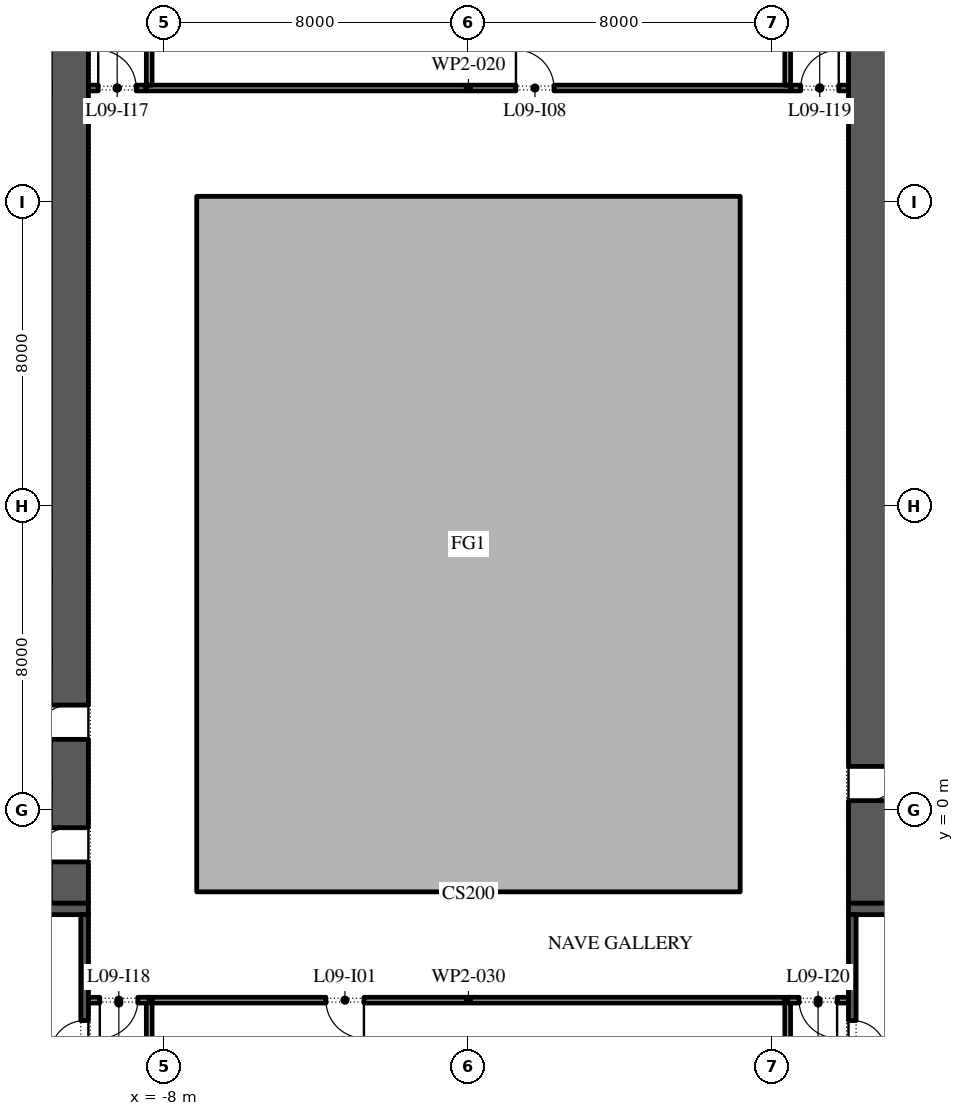
"""IFC4 building model, lengths in metres.
Left out: names, types, materials, properties, quantities, classifications, styles, units other than length and angle.
Written with IfcOpenShell. Run it as: python <this file> out.ifc"""

import sys

from ifc_helpers import new_model, si_unit, direction, frame, frame_2d, origin, place, context, subcontext, project, spatial, polyline, rectangle, outline, extrude, element, fill, save


model = new_model("IFC4")
c1 = context("Model", 3, precision=1e-05, world=origin(), true_north=direction((0.0, 1.0)))
c2 = subcontext(c1, "Body", "Model", "MODEL_VIEW")
j1 = project(units=[si_unit("LENGTHUNIT", "METRE"), si_unit("PLANEANGLEUNIT", "RADIAN")], contexts=[c1])
p1 = place(None, origin())
s1 = spatial("IfcSite", under=j1, at=p1, CompositionType="ELEMENT")
p2 = place(p1, origin())
s2 = spatial("IfcBuilding", under=s1, at=p2, CompositionType="ELEMENT")
p3 = place(p2, frame((0.0, 0.0, 48.0)))
s3 = spatial("IfcBuildingStorey", under=s2, at=p3, CompositionType="ELEMENT", Elevation=48.0)
p4 = place(p3, origin())
e1 = element("IfcWall", 1, at=p4, inside=s3, PredefinedType="STANDARD", context=c2, shape_type="SweptSolid", body=[
    extrude(outline(polyline([(-7.15, -2.15), (7.15, -2.15), (7.15, 16.15), (-7.15, 16.15), (-7.15, -2.15)]), holes=[polyline([(-7.0, -2.0), (-7.0, 16.0), (7.0, 16.0), (7.0, -2.0), (-7.0, -2.0)])]), origin(), (0.0, 0.0, 1.0), 4.0),
])
p5 = place(p3, frame((-10.5, -2.45, 0.0), z_axis=(0.0, 0.0, 1.0), x_axis=(0.0, 1.0, 0.0)))
e2 = element("IfcWall", 2, at=p5, inside=s3, PredefinedType="SHEAR", context=c2, shape_type="SweptSolid", body=[
    extrude(rectangle(XDim=27.9, YDim=1.0, at=frame_2d((13.95, 0.0))), origin(), (0.0, 0.0, 1.0), 4.0),
])
p6 = place(p5, frame((23.65, 0.0, 0.0)))
e3 = element("IfcOpeningElement", 3, at=p6, cuts=e2, PredefinedType="OPENING", context=c2, shape_type="SweptSolid", body=[
    extrude(rectangle(XDim=2.4, YDim=2.1, at=frame_2d((1.2, 1.05))), frame((0.0, 0.51, 0.0), z_axis=(0.0, -1.0, 0.0), x_axis=(1.0, 0.0, 0.0)), (0.0, 0.0, 1.0), 1.02),
])
p7 = place(p5, frame((1.087, 0.0, 0.0)))
e4 = element("IfcOpeningElement", 4, at=p7, cuts=e2, PredefinedType="OPENING", context=c2, shape_type="SweptSolid", body=[
    extrude(rectangle(XDim=0.9, YDim=2.1, at=frame_2d((0.45, 1.05))), frame((0.0, 0.51, 0.0), z_axis=(0.0, -1.0, 0.0), x_axis=(1.0, 0.0, 0.0)), (0.0, 0.0, 1.0), 1.02),
])
p8 = place(p5, frame((4.312, 0.0, 0.0)))
e5 = element("IfcOpeningElement", 5, at=p8, cuts=e2, PredefinedType="OPENING", context=c2, shape_type="SweptSolid", body=[
    extrude(rectangle(XDim=0.9, YDim=2.1, at=frame_2d((0.45, 1.05))), frame((0.0, 0.51, 0.0), z_axis=(0.0, -1.0, 0.0), x_axis=(1.0, 0.0, 0.0)), (0.0, 0.0, 1.0), 1.02),
])
p9 = place(p3, frame((-22.0, -2.6, 0.0), z_axis=(0.0, 0.0, 1.0), x_axis=(1.0, 0.0, 0.0)))
e6 = element("IfcWall", 6, at=p9, inside=s3, PredefinedType="SHEAR", context=c2, shape_type="SweptSolid", body=[
    extrude(rectangle(XDim=12.0, YDim=0.3, at=frame_2d((6.0, 0.0))), origin(), (0.0, 0.0, 1.0), 4.0),
])
p10 = place(p3, frame((-10.1, -15.8, 0.0), z_axis=(0.0, 0.0, 1.0), x_axis=(0.0, 1.0, 0.0)))
e7 = element("IfcWall", 7, at=p10, inside=s3, PredefinedType="SHEAR", context=c2, shape_type="SweptSolid", body=[
    extrude(rectangle(XDim=13.05, YDim=0.2, at=frame_2d((6.525, 0.0))), origin(), (0.0, 0.0, 1.0), 4.0),
])
p11 = place(p10, frame((2.762, 0.0, 0.0)))
e8 = element("IfcOpeningElement", 8, at=p11, cuts=e7, PredefinedType="OPENING", context=c2, shape_type="SweptSolid", body=[
    extrude(rectangle(XDim=0.9, YDim=2.1, at=frame_2d((0.45, 1.05))), frame((0.0, 0.11, 0.0), z_axis=(0.0, -1.0, 0.0), x_axis=(1.0, 0.0, 0.0)), (0.0, 0.0, 1.0), 0.22),
])
p12 = place(p10, frame((9.363, 0.0, 0.0)))
e9 = element("IfcOpeningElement", 9, at=p12, cuts=e7, PredefinedType="OPENING", context=c2, shape_type="SweptSolid", body=[
    extrude(rectangle(XDim=0.9, YDim=2.1, at=frame_2d((0.45, 1.05))), frame((0.0, 0.11, 0.0), z_axis=(0.0, -1.0, 0.0), x_axis=(1.0, 0.0, 0.0)), (0.0, 0.0, 1.0), 0.22),
])
p13 = place(p3, frame((10.5, -2.45, 0.0), z_axis=(0.0, 0.0, 1.0), x_axis=(0.0, 1.0, 0.0)))
e10 = element("IfcWall", 10, at=p13, inside=s3, PredefinedType="SHEAR", context=c2, shape_type="SweptSolid", body=[
    extrude(rectangle(XDim=27.9, YDim=1.0, at=frame_2d((13.95, 0.0))), origin(), (0.0, 0.0, 1.0), 4.0),
])
p14 = place(p13, frame((23.65, 0.0, 0.0)))
e11 = element("IfcOpeningElement", 11, at=p14, cuts=e10, PredefinedType="OPENING", context=c2, shape_type="SweptSolid", body=[
    extrude(rectangle(XDim=2.4, YDim=2.1, at=frame_2d((1.2, 1.05))), frame((0.0, 0.51, 0.0), z_axis=(0.0, -1.0, 0.0), x_axis=(1.0, 0.0, 0.0)), (0.0, 0.0, 1.0), 1.02),
])
p15 = place(p13, frame((2.7, 0.0, 0.0)))
e12 = element("IfcOpeningElement", 12, at=p15, cuts=e10, PredefinedType="OPENING", context=c2, shape_type="SweptSolid", body=[
    extrude(rectangle(XDim=0.9, YDim=2.1, at=frame_2d((0.45, 1.05))), frame((0.0, 0.51, 0.0), z_axis=(0.0, -1.0, 0.0), x_axis=(1.0, 0.0, 0.0)), (0.0, 0.0, 1.0), 1.02),
])
p16 = place(p3, frame((10.0, -2.6, 0.0), z_axis=(0.0, 0.0, 1.0), x_axis=(1.0, 0.0, 0.0)))
e13 = element("IfcWall", 13, at=p16, inside=s3, PredefinedType="SHEAR", context=c2, shape_type="SweptSolid", body=[
    extrude(rectangle(XDim=12.0, YDim=0.3, at=frame_2d((6.0, 0.0))), origin(), (0.0, 0.0, 1.0), 4.0),
])
p17 = place(p3, frame((10.1, -15.8, 0.0), z_axis=(0.0, 0.0, 1.0), x_axis=(0.0, 1.0, 0.0)))
e14 = element("IfcWall", 14, at=p17, inside=s3, PredefinedType="SHEAR", context=c2, shape_type="SweptSolid", body=[
    extrude(rectangle(XDim=13.05, YDim=0.2, at=frame_2d((6.525, 0.0))), origin(), (0.0, 0.0, 1.0), 4.0),
])
p18 = place(p17, frame((1.175, 0.0, 0.0)))
e15 = element("IfcOpeningElement", 15, at=p18, cuts=e14, PredefinedType="OPENING", context=c2, shape_type="SweptSolid", body=[
    extrude(rectangle(XDim=0.9, YDim=2.1, at=frame_2d((0.45, 1.05))), frame((0.0, 0.11, 0.0), z_axis=(0.0, -1.0, 0.0), x_axis=(1.0, 0.0, 0.0)), (0.0, 0.0, 1.0), 0.22),
])
p19 = place(p17, frame((4.413, 0.0, 0.0)))
e16 = element("IfcOpeningElement", 16, at=p19, cuts=e14, PredefinedType="OPENING", context=c2, shape_type="SweptSolid", body=[
    extrude(rectangle(XDim=1.0, YDim=2.1, at=frame_2d((0.5, 1.05))), frame((0.0, 0.11, 0.0), z_axis=(0.0, -1.0, 0.0), x_axis=(1.0, 0.0, 0.0)), (0.0, 0.0, 1.0), 0.22),
])
p20 = place(p17, frame((9.363, 0.0, 0.0)))
e17 = element("IfcOpeningElement", 17, at=p20, cuts=e14, PredefinedType="OPENING", context=c2, shape_type="SweptSolid", body=[
    extrude(rectangle(XDim=0.9, YDim=2.1, at=frame_2d((0.45, 1.05))), frame((0.0, 0.11, 0.0), z_axis=(0.0, -1.0, 0.0), x_axis=(1.0, 0.0, 0.0)), (0.0, 0.0, 1.0), 0.22),
])
p21 = place(p3, frame((-8.4, -4.925, 0.0), z_axis=(0.0, 0.0, 1.0), x_axis=(0.0, -1.0, 0.0)))
e18 = element("IfcWall", 18, at=p21, inside=s3, PredefinedType="PARTITIONING", context=c2, shape_type="SweptSolid", body=[
    extrude(rectangle(XDim=5.195, YDim=0.15, at=frame_2d((2.598, 0.0))), origin(), (0.0, 0.0, 1.0), 4.0),
])
p22 = place(p3, frame((-8.475, 19.0, 0.0), z_axis=(0.0, 0.0, 1.0), x_axis=(1.0, 0.0, 0.0)))
e19 = element("IfcWall", 19, at=p22, inside=s3, PredefinedType="PARTITIONING", context=c2, shape_type="SweptSolid", body=[
    extrude(rectangle(XDim=16.95, YDim=0.15, at=frame_2d((8.475, 0.0))), origin(), (0.0, 0.0, 1.0), 4.0),
])
p23 = place(p22, frame((9.725, 0.0, 0.0)))
e20 = element("IfcOpeningElement", 20, at=p23, cuts=e19, PredefinedType="OPENING", context=c2, shape_type="SweptSolid", body=[
    extrude(rectangle(XDim=1.0, YDim=2.1, at=frame_2d((0.5, 1.05))), frame((0.0, 0.085, 0.0), z_axis=(0.0, -1.0, 0.0), x_axis=(1.0, 0.0, 0.0)), (0.0, 0.0, 1.0), 0.17),
])
p24 = place(p3, frame((-8.4, 27.05, 0.0), z_axis=(0.0, 0.0, 1.0), x_axis=(0.0, -1.0, 0.0)))
e21 = element("IfcWall", 21, at=p24, inside=s3, PredefinedType="PARTITIONING", context=c2, shape_type="SweptSolid", body=[
    extrude(rectangle(XDim=7.975, YDim=0.15, at=frame_2d((3.988, 0.0))), origin(), (0.0, 0.0, 1.0), 4.0),
])
p25 = place(p3, frame((8.4, -10.12, 0.0), z_axis=(0.0, 0.0, 1.0), x_axis=(0.0, 1.0, 0.0)))
e22 = element("IfcWall", 22, at=p25, inside=s3, PredefinedType="PARTITIONING", context=c2, shape_type="SweptSolid", body=[
    extrude(rectangle(XDim=5.195, YDim=0.15, at=frame_2d((2.598, 0.0))), origin(), (0.0, 0.0, 1.0), 4.0),
])
p26 = place(p3, frame((8.325, -5.0, 0.0), z_axis=(0.0, 0.0, 1.0), x_axis=(-1.0, 0.0, 0.0)))
e23 = element("IfcWall", 23, at=p26, inside=s3, PredefinedType="PARTITIONING", context=c2, shape_type="SweptSolid", body=[
    extrude(rectangle(XDim=16.65, YDim=0.15, at=frame_2d((8.325, 0.0))), origin(), (0.0, 0.0, 1.0), 4.0),
])
p27 = place(p26, frame((11.075, 0.0, 0.0)))
e24 = element("IfcOpeningElement", 24, at=p27, cuts=e23, PredefinedType="OPENING", context=c2, shape_type="SweptSolid", body=[
    extrude(rectangle(XDim=1.0, YDim=2.1, at=frame_2d((0.5, 1.05))), frame((0.0, 0.085, 0.0), z_axis=(0.0, -1.0, 0.0), x_axis=(1.0, 0.0, 0.0)), (0.0, 0.0, 1.0), 0.17),
])
p28 = place(p3, frame((8.4, 19.075, 0.0), z_axis=(0.0, 0.0, 1.0), x_axis=(0.0, 1.0, 0.0)))
e25 = element("IfcWall", 25, at=p28, inside=s3, PredefinedType="PARTITIONING", context=c2, shape_type="SweptSolid", body=[
    extrude(rectangle(XDim=7.975, YDim=0.15, at=frame_2d((3.988, 0.0))), origin(), (0.0, 0.0, 1.0), 4.0),
])
p29 = place(p3, frame((-10.0, 19.0, 0.0), z_axis=(0.0, 0.0, 1.0), x_axis=(1.0, 0.0, 0.0)))
e26 = element("IfcWall", 26, at=p29, inside=s3, PredefinedType="PARTITIONING", context=c2, shape_type="SweptSolid", body=[
    extrude(rectangle(XDim=1.515, YDim=0.15, at=frame_2d((0.757, 0.0))), origin(), (0.0, 0.0, 1.0), 4.0),
])
p30 = place(p29, frame((0.258, 0.0, 0.0)))
e27 = element("IfcOpeningElement", 27, at=p30, cuts=e26, PredefinedType="OPENING", context=c2, shape_type="SweptSolid", body=[
    extrude(rectangle(XDim=1.0, YDim=2.1, at=frame_2d((0.5, 1.05))), frame((0.0, 0.085, 0.0), z_axis=(0.0, -1.0, 0.0), x_axis=(1.0, 0.0, 0.0)), (0.0, 0.0, 1.0), 0.17),
])
p31 = place(p3, frame((-8.4, -5.0, 0.0), z_axis=(0.0, 0.0, 1.0), x_axis=(-1.0, 0.0, 0.0)))
e28 = element("IfcWall", 28, at=p31, inside=s3, PredefinedType="PARTITIONING", context=c2, shape_type="SweptSolid", body=[
    extrude(rectangle(XDim=1.6, YDim=0.15, at=frame_2d((0.8, 0.0))), origin(), (0.0, 0.0, 1.0), 4.0),
])
p32 = place(p31, frame((0.3, 0.0, 0.0)))
e29 = element("IfcOpeningElement", 29, at=p32, cuts=e28, PredefinedType="OPENING", context=c2, shape_type="SweptSolid", body=[
    extrude(rectangle(XDim=1.0, YDim=2.1, at=frame_2d((0.5, 1.05))), frame((0.0, 0.085, 0.0), z_axis=(0.0, -1.0, 0.0), x_axis=(1.0, 0.0, 0.0)), (0.0, 0.0, 1.0), 0.17),
])
p33 = place(p3, frame((8.485, 19.0, 0.0), z_axis=(0.0, 0.0, 1.0), x_axis=(1.0, 0.0, 0.0)))
e30 = element("IfcWall", 30, at=p33, inside=s3, PredefinedType="PARTITIONING", context=c2, shape_type="SweptSolid", body=[
    extrude(rectangle(XDim=1.515, YDim=0.15, at=frame_2d((0.757, 0.0))), origin(), (0.0, 0.0, 1.0), 4.0),
])
p34 = place(p33, frame((0.258, 0.0, 0.0)))
e31 = element("IfcOpeningElement", 31, at=p34, cuts=e30, PredefinedType="OPENING", context=c2, shape_type="SweptSolid", body=[
    extrude(rectangle(XDim=1.0, YDim=2.1, at=frame_2d((0.5, 1.05))), frame((0.0, 0.085, 0.0), z_axis=(0.0, -1.0, 0.0), x_axis=(1.0, 0.0, 0.0)), (0.0, 0.0, 1.0), 0.17),
])
p35 = place(p3, frame((10.0, -5.0, 0.0), z_axis=(0.0, 0.0, 1.0), x_axis=(-1.0, 0.0, 0.0)))
e32 = element("IfcWall", 32, at=p35, inside=s3, PredefinedType="PARTITIONING", context=c2, shape_type="SweptSolid", body=[
    extrude(rectangle(XDim=1.6, YDim=0.15, at=frame_2d((0.8, 0.0))), origin(), (0.0, 0.0, 1.0), 4.0),
])
p36 = place(p35, frame((0.3, 0.0, 0.0)))
e33 = element("IfcOpeningElement", 33, at=p36, cuts=e32, PredefinedType="OPENING", context=c2, shape_type="SweptSolid", body=[
    extrude(rectangle(XDim=1.0, YDim=2.1, at=frame_2d((0.5, 1.05))), frame((0.0, 0.085, 0.0), z_axis=(0.0, -1.0, 0.0), x_axis=(1.0, 0.0, 0.0)), (0.0, 0.0, 1.0), 0.17),
])
p37 = place(p12, origin())
e34 = element("IfcDoor", 34, at=p37, inside=s3, OperationType="SINGLE_SWING_RIGHT", PredefinedType="DOOR", context=c2, shape_type="SweptSolid", body=[
    extrude(rectangle(XDim=0.9, YDim=2.1, at=frame_2d((0.45, 1.05))), frame((0.0, 0.1, 0.0), z_axis=(0.0, -1.0, 0.0), x_axis=(1.0, 0.0, 0.0)), (0.0, 0.0, 1.0), 0.05),
])
fill(e9, e34)
p38 = place(p20, frame((0.9, -0.15, 0.0), z_axis=(0.0, 0.0, 1.0), x_axis=(-1.0, 0.0, 0.0)))
e35 = element("IfcDoor", 35, at=p38, inside=s3, OperationType="SINGLE_SWING_LEFT", PredefinedType="DOOR", context=c2, shape_type="SweptSolid", body=[
    extrude(rectangle(XDim=0.9, YDim=2.1, at=frame_2d((0.45, 1.05))), frame((0.0, -0.05, 0.0), z_axis=(0.0, -1.0, 0.0), x_axis=(1.0, 0.0, 0.0)), (0.0, 0.0, 1.0), 0.05),
])
fill(e17, e35)
p39 = place(p27, origin())
e36 = element("IfcDoor", 36, at=p39, inside=s3, OperationType="SINGLE_SWING_RIGHT", PredefinedType="DOOR", context=c2, shape_type="SweptSolid", body=[
    extrude(rectangle(XDim=1.0, YDim=2.1, at=frame_2d((0.5, 1.05))), frame((0.0, 0.025, 0.0), z_axis=(0.0, -1.0, 0.0), x_axis=(1.0, 0.0, 0.0)), (0.0, 0.0, 1.0), 0.05),
])
fill(e24, e36)
p40 = place(p23, origin())
e37 = element("IfcDoor", 37, at=p40, inside=s3, OperationType="SINGLE_SWING_RIGHT", PredefinedType="DOOR", context=c2, shape_type="SweptSolid", body=[
    extrude(rectangle(XDim=1.0, YDim=2.1, at=frame_2d((0.5, 1.05))), frame((0.0, 0.025, 0.0), z_axis=(0.0, -1.0, 0.0), x_axis=(1.0, 0.0, 0.0)), (0.0, 0.0, 1.0), 0.05),
])
fill(e20, e37)
p41 = place(p30, origin())
e38 = element("IfcDoor", 38, at=p41, inside=s3, OperationType="SINGLE_SWING_RIGHT", PredefinedType="DOOR", context=c2, shape_type="SweptSolid", body=[
    extrude(rectangle(XDim=1.0, YDim=2.1, at=frame_2d((0.5, 1.05))), frame((0.0, 0.025, 0.0), z_axis=(0.0, -1.0, 0.0), x_axis=(1.0, 0.0, 0.0)), (0.0, 0.0, 1.0), 0.05),
])
fill(e27, e38)
p42 = place(p32, origin())
e39 = element("IfcDoor", 39, at=p42, inside=s3, OperationType="SINGLE_SWING_LEFT", PredefinedType="DOOR", context=c2, shape_type="SweptSolid", body=[
    extrude(rectangle(XDim=1.0, YDim=2.1, at=frame_2d((0.5, 1.05))), frame((0.0, 0.025, 0.0), z_axis=(0.0, -1.0, 0.0), x_axis=(1.0, 0.0, 0.0)), (0.0, 0.0, 1.0), 0.05),
])
fill(e29, e39)
p43 = place(p34, origin())
e40 = element("IfcDoor", 40, at=p43, inside=s3, OperationType="SINGLE_SWING_LEFT", PredefinedType="DOOR", context=c2, shape_type="SweptSolid", body=[
    extrude(rectangle(XDim=1.0, YDim=2.1, at=frame_2d((0.5, 1.05))), frame((0.0, 0.025, 0.0), z_axis=(0.0, -1.0, 0.0), x_axis=(1.0, 0.0, 0.0)), (0.0, 0.0, 1.0), 0.05),
])
fill(e31, e40)
p44 = place(p36, origin())
e41 = element("IfcDoor", 41, at=p44, inside=s3, OperationType="SINGLE_SWING_RIGHT", PredefinedType="DOOR", context=c2, shape_type="SweptSolid", body=[
    extrude(rectangle(XDim=1.0, YDim=2.1, at=frame_2d((0.5, 1.05))), frame((0.0, 0.025, 0.0), z_axis=(0.0, -1.0, 0.0), x_axis=(1.0, 0.0, 0.0)), (0.0, 0.0, 1.0), 0.05),
])
fill(e33, e41)
save(model, sys.argv[1])
